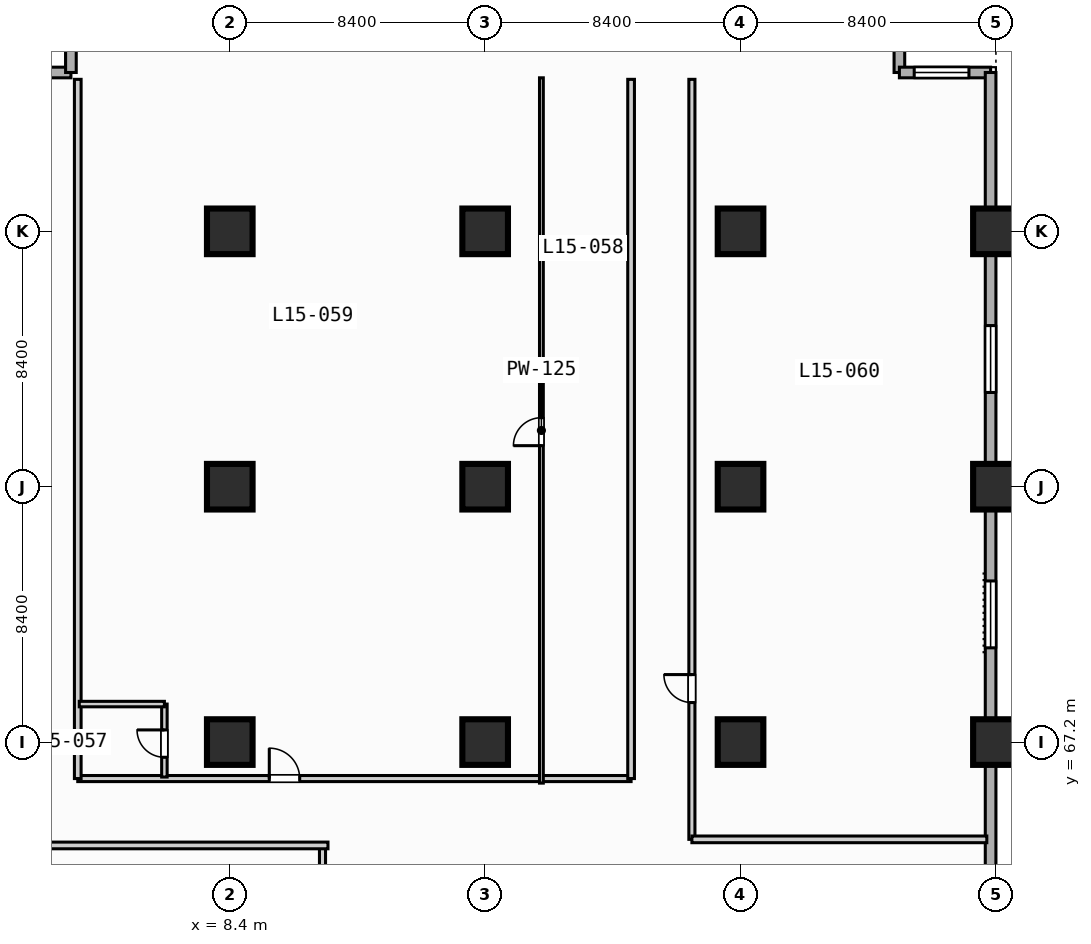
"""IFC4 building model, lengths in metres.
Left out: names, types, materials, properties, quantities, classifications, styles, units other than length and angle.
Written with IfcOpenShell. Run it as: python <this file> out.ifc"""

import sys

from ifc_helpers import new_model, si_unit, direction, frame, frame_2d, origin, origin_2d, place, context, subcontext, project, spatial, rectangle, extrude, element, fill, save


model = new_model("IFC4")
c1 = context("Model", 3, precision=1e-05, world=origin(), true_north=direction((0.0, 1.0)))
c2 = subcontext(c1, "Body", "Model", "MODEL_VIEW")
j1 = project(units=[si_unit("LENGTHUNIT", "METRE"), si_unit("PLANEANGLEUNIT", "RADIAN")], contexts=[c1])
p1 = place(None, origin())
s1 = spatial("IfcSite", under=j1, at=p1, CompositionType="ELEMENT")
p2 = place(p1, origin())
s2 = spatial("IfcBuilding", under=s1, at=p2, CompositionType="ELEMENT")
p3 = place(p2, frame((0.0, 0.0, 66.2)))
s3 = spatial("IfcBuildingStorey", under=s2, at=p3, CompositionType="ELEMENT", Elevation=66.2)
for number, where, z_axis, x_axis in (
    (1, (8.4, 67.2, 0.0), (0.0, 0.0, 1.0), (1.0, 0.0, 0.0)),
    (2, (8.4, 75.6, 0.0), (0.0, 0.0, 1.0), (1.0, 0.0, 0.0)),
    (3, (8.4, 84.0, 0.0), (0.0, 0.0, 1.0), (1.0, 0.0, 0.0)),
    (4, (16.8, 67.2, 0.0), (0.0, 0.0, 1.0), (1.0, 0.0, 0.0)),
    (5, (16.8, 75.6, 0.0), (0.0, 0.0, 1.0), (1.0, 0.0, 0.0)),
    (6, (16.8, 84.0, 0.0), (0.0, 0.0, 1.0), (1.0, 0.0, 0.0)),
    (7, (25.2, 67.2, 0.0), (0.0, 0.0, 1.0), (1.0, 0.0, 0.0)),
    (8, (25.2, 75.6, 0.0), (0.0, 0.0, 1.0), (1.0, 0.0, 0.0)),
    (9, (25.2, 84.0, 0.0), (0.0, 0.0, 1.0), (1.0, 0.0, 0.0)),
    (10, (33.6, 67.2, 0.0), (0.0, 0.0, 1.0), (1.0, 0.0, 0.0)),
    (11, (33.6, 75.6, 0.0), (0.0, 0.0, 1.0), (1.0, 0.0, 0.0)),
    (12, (33.6, 84.0, 0.0), (0.0, 0.0, 1.0), (1.0, 0.0, 0.0)),
):
    element("IfcColumn", number, at=place(p3, frame(where, z_axis=z_axis, x_axis=x_axis)), inside=s3, PredefinedType="COLUMN", context=c2, shape_type="SweptSolid", body=[
        extrude(rectangle(XDim=1.5, YDim=1.5, at=origin_2d()), origin(), (0.0, 0.0, 1.0), 3.8),
    ])
for number, where, z_axis, x_axis in (
    (13, (0.175, 89.225, 0.0), (0.0, 0.0, 1.0), (1.0, 0.0, 0.0)),
    (14, (3.175, 89.225, 0.0), (0.0, 0.0, 1.0), (0.0, 1.0, 0.0)),
    (15, (30.425, 92.225, 0.0), (0.0, 0.0, 1.0), (0.0, -1.0, 0.0)),
):
    element("IfcWall", number, at=place(p3, frame(where, z_axis=z_axis, x_axis=x_axis)), inside=s3, PredefinedType="STANDARD", context=c2, shape_type="SweptSolid", body=[
        extrude(rectangle(XDim=3.0, YDim=0.35, at=frame_2d((1.5, 0.0))), origin(), (0.0, 0.0, 1.0), 3.55),
    ])
p4 = place(p3, frame((30.425, 89.225, 0.0), z_axis=(0.0, 0.0, 1.0), x_axis=(1.0, 0.0, 0.0)))
e16 = element("IfcWall", 16, at=p4, inside=s3, PredefinedType="STANDARD", context=c2, shape_type="SweptSolid", body=[
    extrude(rectangle(XDim=3.0, YDim=0.35, at=frame_2d((1.5, 0.0))), origin(), (0.0, 0.0, 1.0), 3.55),
])
p5 = place(p4, frame((0.488, 0.0, 0.85)))
e17 = element("IfcOpeningElement", 17, at=p5, cuts=e16, PredefinedType="OPENING", context=c2, shape_type="SweptSolid", body=[
    extrude(rectangle(XDim=1.8, YDim=1.8, at=frame_2d((0.9, 0.9))), frame((0.0, 0.185, 0.0), z_axis=(0.0, -1.0, 0.0), x_axis=(1.0, 0.0, 0.0)), (0.0, 0.0, 1.0), 0.37),
])
p6 = place(p3, frame((33.425, 89.225, 0.0), z_axis=(0.0, 0.0, 1.0), x_axis=(0.0, -1.0, 0.0)))
e18 = element("IfcWall", 18, at=p6, inside=s3, PredefinedType="STANDARD", context=c2, shape_type="SweptSolid", body=[
    extrude(rectangle(XDim=55.8, YDim=0.35, at=frame_2d((27.9, 0.0))), origin(), (0.0, 0.0, 1.0), 3.55),
])
p7 = place(p6, frame((16.725, 0.0, 0.85)))
e19 = element("IfcOpeningElement", 19, at=p7, cuts=e18, PredefinedType="OPENING", context=c2, shape_type="SweptSolid", body=[
    extrude(rectangle(XDim=2.2, YDim=1.8, at=frame_2d((1.1, 0.9))), frame((0.0, 0.185, 0.0), z_axis=(0.0, -1.0, 0.0), x_axis=(1.0, 0.0, 0.0)), (0.0, 0.0, 1.0), 0.37),
])
p8 = place(p6, frame((8.325, 0.0, 0.85)))
e20 = element("IfcOpeningElement", 20, at=p8, cuts=e18, PredefinedType="OPENING", context=c2, shape_type="SweptSolid", body=[
    extrude(rectangle(XDim=2.2, YDim=1.8, at=frame_2d((1.1, 0.9))), frame((0.0, 0.185, 0.0), z_axis=(0.0, -1.0, 0.0), x_axis=(1.0, 0.0, 0.0)), (0.0, 0.0, 1.0), 0.37),
])
p9 = place(p3, frame((11.45, 3.4, 0.0), z_axis=(0.0, 0.0, 1.0), x_axis=(0.0, 1.0, 0.0)))
e21 = element("IfcWall", 21, at=p9, inside=s3, PredefinedType="PARTITIONING", context=c2, shape_type="SweptSolid", body=[
    extrude(rectangle(XDim=60.4, YDim=0.2, at=frame_2d((30.2, 0.0))), origin(), (0.0, 0.0, 1.0), 3.55),
])
p10 = place(p9, frame((4.465, 0.0, 0.0)))
e22 = element("IfcOpeningElement", 22, at=p10, cuts=e21, PredefinedType="OPENING", context=c2, shape_type="SweptSolid", body=[
    extrude(rectangle(XDim=1.0, YDim=2.15, at=frame_2d((0.5, 1.075))), frame((0.0, 0.11, 0.0), z_axis=(0.0, -1.0, 0.0), x_axis=(1.0, 0.0, 0.0)), (0.0, 0.0, 1.0), 0.22),
])
p11 = place(p9, frame((14.665, 0.0, 0.0)))
e23 = element("IfcOpeningElement", 23, at=p11, cuts=e21, PredefinedType="OPENING", context=c2, shape_type="SweptSolid", body=[
    extrude(rectangle(XDim=1.0, YDim=2.15, at=frame_2d((0.5, 1.075))), frame((0.0, 0.11, 0.0), z_axis=(0.0, -1.0, 0.0), x_axis=(1.0, 0.0, 0.0)), (0.0, 0.0, 1.0), 0.22),
])
p12 = place(p9, frame((22.535, 0.0, 0.0)))
e24 = element("IfcOpeningElement", 24, at=p12, cuts=e21, PredefinedType="OPENING", context=c2, shape_type="SweptSolid", body=[
    extrude(rectangle(XDim=1.0, YDim=2.15, at=frame_2d((0.5, 1.075))), frame((0.0, 0.11, 0.0), z_axis=(0.0, -1.0, 0.0), x_axis=(1.0, 0.0, 0.0)), (0.0, 0.0, 1.0), 0.22),
])
p13 = place(p9, frame((31.16, 0.0, 0.0)))
e25 = element("IfcOpeningElement", 25, at=p13, cuts=e21, PredefinedType="OPENING", context=c2, shape_type="SweptSolid", body=[
    extrude(rectangle(XDim=1.0, YDim=2.15, at=frame_2d((0.5, 1.075))), frame((0.0, 0.11, 0.0), z_axis=(0.0, -1.0, 0.0), x_axis=(1.0, 0.0, 0.0)), (0.0, 0.0, 1.0), 0.22),
])
p14 = place(p9, frame((42.36, 0.0, 0.0)))
e26 = element("IfcOpeningElement", 26, at=p14, cuts=e21, PredefinedType="OPENING", context=c2, shape_type="SweptSolid", body=[
    extrude(rectangle(XDim=1.0, YDim=2.15, at=frame_2d((0.5, 1.075))), frame((0.0, 0.11, 0.0), z_axis=(0.0, -1.0, 0.0), x_axis=(1.0, 0.0, 0.0)), (0.0, 0.0, 1.0), 0.22),
])
p15 = place(p9, frame((56.065, 0.0, 0.0)))
e27 = element("IfcOpeningElement", 27, at=p15, cuts=e21, PredefinedType="OPENING", context=c2, shape_type="SweptSolid", body=[
    extrude(rectangle(XDim=1.0, YDim=2.15, at=frame_2d((0.5, 1.075))), frame((0.0, 0.11, 0.0), z_axis=(0.0, -1.0, 0.0), x_axis=(1.0, 0.0, 0.0)), (0.0, 0.0, 1.0), 0.22),
])
p16 = place(p3, frame((0.2, 63.8, 0.0), z_axis=(0.0, 0.0, 1.0), x_axis=(1.0, 0.0, 0.0)))
e28 = element("IfcWall", 28, at=p16, inside=s3, PredefinedType="PARTITIONING", context=c2, shape_type="SweptSolid", body=[
    extrude(rectangle(XDim=11.43, YDim=0.22, at=frame_2d((5.715, 0.0))), origin(), (0.0, 0.0, 1.0), 3.55),
])
p17 = place(p3, frame((3.4, 66.0, 0.0), z_axis=(0.0, 0.0, 1.0), x_axis=(1.0, 0.0, 0.0)))
e29 = element("IfcWall", 29, at=p17, inside=s3, PredefinedType="PARTITIONING", context=c2, shape_type="SweptSolid", body=[
    extrude(rectangle(XDim=18.2, YDim=0.2, at=frame_2d((9.1, 0.0))), origin(), (0.0, 0.0, 1.0), 3.55),
])
p18 = place(p17, frame((6.3, 0.0, 0.0)))
e30 = element("IfcOpeningElement", 30, at=p18, cuts=e29, PredefinedType="OPENING", context=c2, shape_type="SweptSolid", body=[
    extrude(rectangle(XDim=1.0, YDim=2.15, at=frame_2d((0.5, 1.075))), frame((0.0, 0.11, 0.0), z_axis=(0.0, -1.0, 0.0), x_axis=(1.0, 0.0, 0.0)), (0.0, 0.0, 1.0), 0.22),
])
for number, where, z_axis, x_axis in (
    (31, (21.6, 66.0, 0.0), (0.0, 0.0, 1.0), (0.0, 1.0, 0.0)),
    (32, (3.4, 66.0, 0.0), (0.0, 0.0, 1.0), (0.0, 1.0, 0.0)),
):
    element("IfcWall", number, at=place(p3, frame(where, z_axis=z_axis, x_axis=x_axis)), inside=s3, PredefinedType="PARTITIONING", context=c2, shape_type="SweptSolid", body=[
        extrude(rectangle(XDim=23.0, YDim=0.22, at=frame_2d((11.5, 0.0))), origin(), (0.0, 0.0, 1.0), 3.55),
    ])
p19 = place(p3, frame((6.25, 66.05, 0.0), z_axis=(0.0, 0.0, 1.0), x_axis=(0.0, 1.0, 0.0)))
e33 = element("IfcWall", 33, at=p19, inside=s3, PredefinedType="PLUMBINGWALL", context=c2, shape_type="SweptSolid", body=[
    extrude(rectangle(XDim=2.4, YDim=0.18, at=frame_2d((1.2, 0.0))), origin(), (0.0, 0.0, 1.0), 3.55),
])
p20 = place(p19, frame((0.65, 0.0, 0.0)))
e34 = element("IfcOpeningElement", 34, at=p20, cuts=e33, PredefinedType="OPENING", context=c2, shape_type="SweptSolid", body=[
    extrude(rectangle(XDim=0.9, YDim=2.1, at=frame_2d((0.45, 1.05))), frame((0.0, 0.1, 0.0), z_axis=(0.0, -1.0, 0.0), x_axis=(1.0, 0.0, 0.0)), (0.0, 0.0, 1.0), 0.2),
])
p21 = place(p3, frame((3.45, 68.45, 0.0), z_axis=(0.0, 0.0, 1.0), x_axis=(1.0, 0.0, 0.0)))
e35 = element("IfcWall", 35, at=p21, inside=s3, PredefinedType="PLUMBINGWALL", context=c2, shape_type="SweptSolid", body=[
    extrude(rectangle(XDim=2.8, YDim=0.18, at=frame_2d((1.4, 0.0))), origin(), (0.0, 0.0, 1.0), 3.55),
])
p22 = place(p3, frame((18.65, 65.85, 0.0), z_axis=(0.0, 0.0, 1.0), x_axis=(0.0, 1.0, 0.0)))
e36 = element("IfcWall", 36, at=p22, inside=s3, PredefinedType="PARTITIONING", context=c2, shape_type="SweptSolid", body=[
    extrude(rectangle(XDim=23.2, YDim=0.125, at=frame_2d((11.6, 0.0))), origin(), (0.0, 0.0, 1.0), 3.55),
])
p23 = place(p22, frame((11.1, 0.0, 0.0)))
e37 = element("IfcOpeningElement", 37, at=p23, cuts=e36, PredefinedType="OPENING", context=c2, shape_type="SweptSolid", body=[
    extrude(rectangle(XDim=0.92, YDim=2.1, at=frame_2d((0.46, 1.05))), frame((0.0, 0.073, 0.0), z_axis=(0.0, -1.0, 0.0), x_axis=(1.0, 0.0, 0.0)), (0.0, 0.0, 1.0), 0.145),
])
p24 = place(p3, frame((23.6, 64.0, 0.0), z_axis=(0.0, 0.0, 1.0), x_axis=(0.0, 1.0, 0.0)))
e38 = element("IfcWall", 38, at=p24, inside=s3, PredefinedType="PARTITIONING", context=c2, shape_type="SweptSolid", body=[
    extrude(rectangle(XDim=25.0, YDim=0.2, at=frame_2d((12.5, 0.0))), origin(), (0.0, 0.0, 1.0), 3.55),
])
p25 = place(p24, frame((4.5, 0.0, 0.0)))
e39 = element("IfcOpeningElement", 39, at=p25, cuts=e38, PredefinedType="OPENING", context=c2, shape_type="SweptSolid", body=[
    extrude(rectangle(XDim=0.92, YDim=2.1, at=frame_2d((0.46, 1.05))), frame((0.0, 0.11, 0.0), z_axis=(0.0, -1.0, 0.0), x_axis=(1.0, 0.0, 0.0)), (0.0, 0.0, 1.0), 0.22),
])
p26 = place(p3, frame((23.6, 64.0, 0.0), z_axis=(0.0, 0.0, 1.0), x_axis=(1.0, 0.0, 0.0)))
e40 = element("IfcWall", 40, at=p26, inside=s3, PredefinedType="PARTITIONING", context=c2, shape_type="SweptSolid", body=[
    extrude(rectangle(XDim=9.7, YDim=0.22, at=frame_2d((4.85, 0.0))), origin(), (0.0, 0.0, 1.0), 3.55),
])
p27 = place(p5, origin())
e41 = element("IfcWindow", 41, at=p27, inside=s3, PartitioningType="SINGLE_PANEL", PredefinedType="WINDOW", context=c2, shape_type="SweptSolid", body=[
    extrude(rectangle(XDim=1.8, YDim=1.8, at=frame_2d((0.9, 0.9))), frame((0.0, 0.03, 0.0), z_axis=(0.0, -1.0, 0.0), x_axis=(1.0, 0.0, 0.0)), (0.0, 0.0, 1.0), 0.06),
])
fill(e17, e41)
p28 = place(p7, origin())
e42 = element("IfcWindow", 42, at=p28, inside=s3, PartitioningType="SINGLE_PANEL", PredefinedType="WINDOW", context=c2, shape_type="SweptSolid", body=[
    extrude(rectangle(XDim=2.2, YDim=1.8, at=frame_2d((1.1, 0.9))), frame((0.0, 0.03, 0.0), z_axis=(0.0, -1.0, 0.0), x_axis=(1.0, 0.0, 0.0)), (0.0, 0.0, 1.0), 0.06),
])
fill(e19, e42)
p29 = place(p8, origin())
e43 = element("IfcWindow", 43, at=p29, inside=s3, PartitioningType="SINGLE_PANEL", PredefinedType="WINDOW", context=c2, shape_type="SweptSolid", body=[
    extrude(rectangle(XDim=2.2, YDim=1.8, at=frame_2d((1.1, 0.9))), frame((0.0, 0.03, 0.0), z_axis=(0.0, -1.0, 0.0), x_axis=(1.0, 0.0, 0.0)), (0.0, 0.0, 1.0), 0.06),
])
fill(e20, e43)
p30 = place(p18, origin())
e44 = element("IfcDoor", 44, at=p30, inside=s3, OperationType="SINGLE_SWING_LEFT", PredefinedType="DOOR", context=c2, shape_type="SweptSolid", body=[
    extrude(rectangle(XDim=1.0, YDim=2.15, at=frame_2d((0.5, 1.075))), frame((0.0, 0.025, 0.0), z_axis=(0.0, -1.0, 0.0), x_axis=(1.0, 0.0, 0.0)), (0.0, 0.0, 1.0), 0.05),
])
fill(e30, e44)
p31 = place(p20, origin())
e45 = element("IfcDoor", 45, at=p31, inside=s3, OperationType="SINGLE_SWING_RIGHT", PredefinedType="DOOR", context=c2, shape_type="SweptSolid", body=[
    extrude(rectangle(XDim=0.9, YDim=2.1, at=frame_2d((0.45, 1.05))), frame((0.0, 0.025, 0.0), z_axis=(0.0, -1.0, 0.0), x_axis=(1.0, 0.0, 0.0)), (0.0, 0.0, 1.0), 0.05),
])
fill(e34, e45)
p32 = place(p23, origin())
e46 = element("IfcDoor", 46, at=p32, inside=s3, OperationType="SINGLE_SWING_LEFT", PredefinedType="DOOR", context=c2, shape_type="SweptSolid", body=[
    extrude(rectangle(XDim=0.92, YDim=2.1, at=frame_2d((0.46, 1.05))), frame((0.0, 0.025, 0.0), z_axis=(0.0, -1.0, 0.0), x_axis=(1.0, 0.0, 0.0)), (0.0, 0.0, 1.0), 0.05),
])
fill(e37, e46)
p33 = place(p25, origin())
e47 = element("IfcDoor", 47, at=p33, inside=s3, OperationType="SINGLE_SWING_RIGHT", PredefinedType="DOOR", context=c2, shape_type="SweptSolid", body=[
    extrude(rectangle(XDim=0.92, YDim=2.1, at=frame_2d((0.46, 1.05))), frame((0.0, 0.025, 0.0), z_axis=(0.0, -1.0, 0.0), x_axis=(1.0, 0.0, 0.0)), (0.0, 0.0, 1.0), 0.05),
])
fill(e39, e47)
save(model, sys.argv[1])
